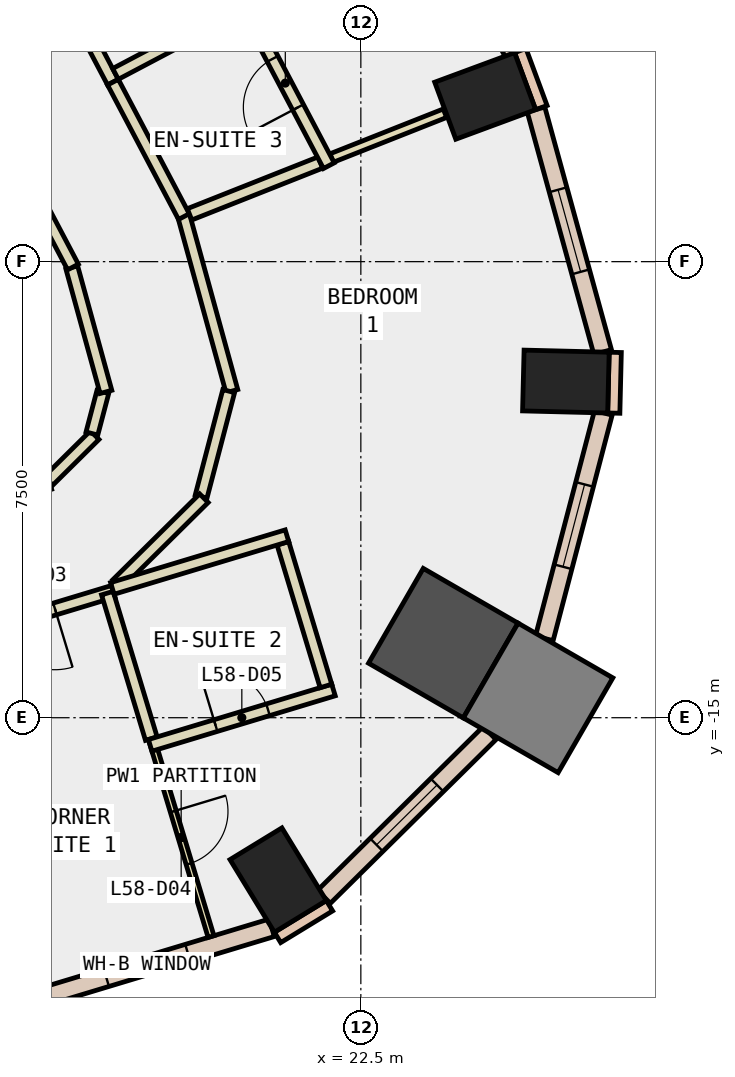
"""IFC4 building model, lengths in metres.
Left out: names, types, materials, properties, quantities, classifications, styles, units other than length and angle.
Written with IfcOpenShell. Run it as: python <this file> out.ifc"""

import sys

from ifc_helpers import new_model, si_unit, direction, frame, frame_2d, origin, origin_2d, place, context, subcontext, project, spatial, rectangle, extrude, element, fill, save


model = new_model("IFC4")
c1 = context("Model", 3, precision=1e-05, world=origin(), true_north=direction((0.0, 1.0)))
c2 = subcontext(c1, "Body", "Model", "MODEL_VIEW")
j1 = project(units=[si_unit("LENGTHUNIT", "METRE"), si_unit("PLANEANGLEUNIT", "RADIAN")], contexts=[c1])
p1 = place(None, origin())
s1 = spatial("IfcSite", under=j1, at=p1, CompositionType="ELEMENT")
p2 = place(p1, origin())
s2 = spatial("IfcBuilding", under=s1, at=p2, CompositionType="ELEMENT")
p3 = place(p2, frame((0.0, 0.0, 255.8)))
s3 = spatial("IfcBuildingStorey", under=s2, at=p3, CompositionType="ELEMENT", Elevation=255.8)
p4 = place(p3, frame((21.14, -17.67, -0.34), z_axis=(0.0, 0.0, 1.0), x_axis=(0.853341581839, 0.521352227103, 0.0)))
e1 = element("IfcColumn", 1, at=p4, inside=s3, PredefinedType="COLUMN", context=c2, shape_type="SweptSolid", body=[
    extrude(rectangle(XDim=1.0, YDim=1.4, at=origin_2d()), origin(), (0.0, 0.0, 1.0), 3.6),
])
p5 = place(p3, frame((23.856, -13.774, -0.34), z_axis=(0.0, 0.0, 1.0), x_axis=(-0.866025403784, 0.5, 0.0)))
e2 = element("IfcColumn", 2, at=p5, inside=s3, PredefinedType="COLUMN", context=c2, shape_type="SweptSolid", body=[
    extrude(rectangle(XDim=1.8, YDim=1.8, at=origin_2d()), origin(), (0.0, 0.0, 1.0), 3.6),
])
for number, where, z_axis, x_axis in (
    (3, (25.872, -9.472, -0.34), (0.0, 0.0, 1.0), (0.025, 1.0, 0.0)),
    (4, (24.545, -4.775, -0.34), (0.0, 0.0, 1.0), (-0.347, 0.938, 0.0)),
):
    element("IfcColumn", number, at=place(p3, frame(where, z_axis=z_axis, x_axis=x_axis)), inside=s3, PredefinedType="COLUMN", context=c2, shape_type="SweptSolid", body=[
        extrude(rectangle(XDim=1.0, YDim=1.4, at=origin_2d()), origin(), (0.0, 0.0, 1.0), 3.6),
    ])
p6 = place(p3, frame((25.415, -14.674, -0.34), z_axis=(0.0, 0.0, 1.0), x_axis=(-0.866025403784, 0.5, 0.0)))
e5 = element("IfcColumn", 5, at=p6, inside=s3, PredefinedType="COLUMN", context=c2, shape_type="SweptSolid", body=[
    extrude(rectangle(XDim=1.8, YDim=1.8, at=origin_2d()), origin(), (0.0, 0.0, 1.0), 3.6),
])
p7 = place(p3, frame((25.469, -4.967, 0.0), z_axis=(0.0, 0.0, 1.0), x_axis=(-0.346892928577, 0.937904737222, 0.0)))
e6 = element("IfcWall", 6, at=p7, inside=s3, PredefinedType="STANDARD", context=c2, shape_type="SweptSolid", body=[
    extrude(rectangle(XDim=1.0, YDim=0.2, at=frame_2d((0.5, 0.0))), origin(), (0.0, 0.0, 1.0), 3.26),
])
p8 = place(p3, frame((21.13, -18.613, 0.0), z_axis=(0.0, 0.0, 1.0), x_axis=(0.853679739553, 0.520798331677, 0.0)))
e7 = element("IfcWall", 7, at=p8, inside=s3, PredefinedType="STANDARD", context=c2, shape_type="SweptSolid", body=[
    extrude(rectangle(XDim=1.0, YDim=0.2, at=frame_2d((0.5, 0.0))), origin(), (0.0, 0.0, 1.0), 3.26),
])
p9 = place(p3, frame((26.66, -9.991, 0.0), z_axis=(0.0, 0.0, 1.0), x_axis=(0.024186470916, 0.999707464524, 0.0)))
e8 = element("IfcWall", 8, at=p9, inside=s3, PredefinedType="STANDARD", context=c2, shape_type="SweptSolid", body=[
    extrude(rectangle(XDim=0.999, YDim=0.2, at=frame_2d((0.5, 0.0))), origin(), (0.0, 0.0, 1.0), 3.26),
])
p10 = place(p3, frame((16.936, -19.692, 0.0), z_axis=(0.0, 0.0, 1.0), x_axis=(0.957346168713, 0.288943442997, 0.0)))
e9 = element("IfcWall", 9, at=p10, inside=s3, PredefinedType="STANDARD", context=c2, shape_type="SweptSolid", body=[
    extrude(rectangle(XDim=4.281, YDim=0.3, at=frame_2d((2.14, 0.0))), origin(), (0.0, 0.0, 1.0), 3.26),
])
p11 = place(p10, frame((1.44, 0.0, 0.9)))
e10 = element("IfcOpeningElement", 10, at=p11, cuts=e9, PredefinedType="OPENING", context=c2, shape_type="SweptSolid", body=[
    extrude(rectangle(XDim=1.4, YDim=2.0, at=frame_2d((0.7, 1.0))), frame((0.0, 0.16, 0.0), z_axis=(0.0, -1.0, 0.0), x_axis=(1.0, 0.0, 0.0)), (0.0, 0.0, 1.0), 0.32),
])
p12 = place(p3, frame((21.893, -17.946, 0.0), z_axis=(0.0, 0.0, 1.0), x_axis=(0.71110935557, 0.703081420904, 0.0)))
e11 = element("IfcWall", 11, at=p12, inside=s3, PredefinedType="STANDARD", context=c2, shape_type="SweptSolid", body=[
    extrude(rectangle(XDim=3.832, YDim=0.3, at=frame_2d((1.916, 0.0))), origin(), (0.0, 0.0, 1.0), 3.26),
])
p13 = place(p12, frame((1.216, 0.0, 0.9)))
e12 = element("IfcOpeningElement", 12, at=p13, cuts=e11, PredefinedType="OPENING", context=c2, shape_type="SweptSolid", body=[
    extrude(rectangle(XDim=1.4, YDim=2.0, at=frame_2d((0.7, 1.0))), frame((0.0, 0.16, 0.0), z_axis=(0.0, -1.0, 0.0), x_axis=(1.0, 0.0, 0.0)), (0.0, 0.0, 1.0), 0.32),
])
p14 = place(p3, frame((25.517, -13.695, 0.0), z_axis=(0.0, 0.0, 1.0), x_axis=(0.253248721632, 0.967401201669, 0.0)))
e13 = element("IfcWall", 13, at=p14, inside=s3, PredefinedType="STANDARD", context=c2, shape_type="SweptSolid", body=[
    extrude(rectangle(XDim=3.834, YDim=0.3, at=frame_2d((1.917, 0.0))), origin(), (0.0, 0.0, 1.0), 3.26),
])
p15 = place(p14, frame((1.217, 0.0, 0.9)))
e14 = element("IfcOpeningElement", 14, at=p15, cuts=e13, PredefinedType="OPENING", context=c2, shape_type="SweptSolid", body=[
    extrude(rectangle(XDim=1.4, YDim=2.0, at=frame_2d((0.7, 1.0))), frame((0.0, 0.16, 0.0), z_axis=(0.0, -1.0, 0.0), x_axis=(1.0, 0.0, 0.0)), (0.0, 0.0, 1.0), 0.32),
])
p16 = place(p3, frame((26.477, -8.987, 0.0), z_axis=(0.0, 0.0, 1.0), x_axis=(-0.264924661919, 0.964269113633, 0.0)))
e15 = element("IfcWall", 15, at=p16, inside=s3, PredefinedType="STANDARD", context=c2, shape_type="SweptSolid", body=[
    extrude(rectangle(XDim=4.137, YDim=0.3, at=frame_2d((2.068, 0.0))), origin(), (0.0, 0.0, 1.0), 3.26),
])
p17 = place(p16, frame((1.368, 0.0, 0.9)))
e16 = element("IfcOpeningElement", 16, at=p17, cuts=e15, PredefinedType="OPENING", context=c2, shape_type="SweptSolid", body=[
    extrude(rectangle(XDim=1.4, YDim=2.0, at=frame_2d((0.7, 1.0))), frame((0.0, 0.16, 0.0), z_axis=(0.0, -1.0, 0.0), x_axis=(1.0, 0.0, 0.0)), (0.0, 0.0, 1.0), 0.32),
])
p18 = place(p3, frame((25.012, -4.07, 0.0), z_axis=(0.0, 0.0, 1.0), x_axis=(-0.466663589714, 0.884434900959, 0.0)))
e17 = element("IfcWall", 17, at=p18, inside=s3, PredefinedType="STANDARD", context=c2, shape_type="SweptSolid", body=[
    extrude(rectangle(XDim=5.638, YDim=0.3, at=frame_2d((2.819, 0.0))), origin(), (0.0, 0.0, 1.0), 3.26),
])
p19 = place(p18, frame((0.459, 0.0, 0.9)))
e18 = element("IfcOpeningElement", 18, at=p19, cuts=e17, PredefinedType="OPENING", context=c2, shape_type="SweptSolid", body=[
    extrude(rectangle(XDim=1.9, YDim=2.0, at=frame_2d((0.95, 1.0))), frame((0.0, 0.16, 0.0), z_axis=(0.0, -1.0, 0.0), x_axis=(1.0, 0.0, 0.0)), (0.0, 0.0, 1.0), 0.32),
])
p20 = place(p18, frame((3.278, 0.0, 0.9)))
e19 = element("IfcOpeningElement", 19, at=p20, cuts=e17, PredefinedType="OPENING", context=c2, shape_type="SweptSolid", body=[
    extrude(rectangle(XDim=1.9, YDim=2.0, at=frame_2d((0.95, 1.0))), frame((0.0, 0.16, 0.0), z_axis=(0.0, -1.0, 0.0), x_axis=(1.0, 0.0, 0.0)), (0.0, 0.0, 1.0), 0.32),
])
p21 = place(p3, frame((17.362, -11.106, 0.0), z_axis=(0.0, 0.0, 1.0), x_axis=(0.710859741153, 0.703333795866, 0.0)))
e20 = element("IfcWall", 20, at=p21, inside=s3, PredefinedType="PARTITIONING", context=c2, shape_type="SweptSolid", body=[
    extrude(rectangle(XDim=1.071, YDim=0.2, at=frame_2d((0.535, 0.0))), origin(), (0.0, 0.0, 1.0), 3.26),
])
p22 = place(p3, frame((18.077, -10.326, 0.0), z_axis=(0.0, 0.0, 1.0), x_axis=(0.254782174857, 0.966998471237, 0.0)))
e21 = element("IfcWall", 21, at=p22, inside=s3, PredefinedType="PARTITIONING", context=c2, shape_type="SweptSolid", body=[
    extrude(rectangle(XDim=0.707, YDim=0.2, at=frame_2d((0.354, 0.0))), origin(), (0.0, 0.0, 1.0), 3.26),
])
p23 = place(p3, frame((18.308, -9.642, 0.0), z_axis=(0.0, 0.0, 1.0), x_axis=(-0.264859637197, 0.96428697626, 0.0)))
e22 = element("IfcWall", 22, at=p23, inside=s3, PredefinedType="PARTITIONING", context=c2, shape_type="SweptSolid", body=[
    extrude(rectangle(XDim=2.122, YDim=0.2, at=frame_2d((1.061, 0.0))), origin(), (0.0, 0.0, 1.0), 3.26),
])
p24 = place(p3, frame((17.766, -7.588, 0.0), z_axis=(0.0, 0.0, 1.0), x_axis=(-0.466727344864, 0.884401258228, 0.0)))
e23 = element("IfcWall", 23, at=p24, inside=s3, PredefinedType="PARTITIONING", context=c2, shape_type="SweptSolid", body=[
    extrude(rectangle(XDim=2.205, YDim=0.2, at=frame_2d((1.103, 0.0))), origin(), (0.0, 0.0, 1.0), 3.26),
])
p25 = place(p3, frame((18.427, -12.922, 0.0), z_axis=(0.0, 0.0, 1.0), x_axis=(-0.957336631432, -0.288975040651, 0.0)))
e24 = element("IfcWall", 24, at=p25, inside=s3, PredefinedType="PARTITIONING", context=c2, shape_type="SweptSolid", body=[
    extrude(rectangle(XDim=3.0, YDim=0.2, at=frame_2d((1.5, 0.0))), origin(), (0.0, 0.0, 1.0), 3.26),
])
p26 = place(p25, frame((1.0, 0.0, 0.0)))
e25 = element("IfcOpeningElement", 25, at=p26, cuts=e24, PredefinedType="OPENING", context=c2, shape_type="SweptSolid", body=[
    extrude(rectangle(XDim=1.0, YDim=2.1, at=frame_2d((0.5, 1.05))), frame((0.0, 0.11, 0.0), z_axis=(0.0, -1.0, 0.0), x_axis=(1.0, 0.0, 0.0)), (0.0, 0.0, 1.0), 0.22),
])
p27 = place(p3, frame((19.564, -6.662, 0.0), z_axis=(0.0, 0.0, 1.0), x_axis=(0.264876135597, -0.96428244451, 0.0)))
e26 = element("IfcWall", 26, at=p27, inside=s3, PredefinedType="PARTITIONING", context=c2, shape_type="SweptSolid", body=[
    extrude(rectangle(XDim=3.077, YDim=0.2, at=frame_2d((1.538, 0.0))), origin(), (0.0, 0.0, 1.0), 3.26),
])
p28 = place(p3, frame((20.327, -9.629, 0.0), z_axis=(0.0, 0.0, 1.0), x_axis=(-0.253192482031, -0.967415922467, 0.0)))
e27 = element("IfcWall", 27, at=p28, inside=s3, PredefinedType="PARTITIONING", context=c2, shape_type="SweptSolid", body=[
    extrude(rectangle(XDim=1.792, YDim=0.2, at=frame_2d((0.896, 0.0))), origin(), (0.0, 0.0, 1.0), 3.26),
])
p29 = place(p3, frame((19.919, -11.39, 0.0), z_axis=(0.0, 0.0, 1.0), x_axis=(-0.71104667794, -0.70314480855, 0.0)))
e28 = element("IfcWall", 28, at=p29, inside=s3, PredefinedType="PARTITIONING", context=c2, shape_type="SweptSolid", body=[
    extrude(rectangle(XDim=2.008, YDim=0.2, at=frame_2d((1.004, 0.0))), origin(), (0.0, 0.0, 1.0), 3.26),
])
p30 = place(p3, frame((16.778, -1.429, 0.0), z_axis=(0.0, 0.0, 1.0), x_axis=(0.466493865945, -0.884524433261, 0.0)))
e29 = element("IfcWall", 29, at=p30, inside=s3, PredefinedType="PARTITIONING", context=c2, shape_type="SweptSolid", body=[
    extrude(rectangle(XDim=3.526, YDim=0.2, at=frame_2d((1.763, 0.0))), origin(), (0.0, 0.0, 1.0), 3.26),
])
p31 = place(p30, frame((1.313, 0.0, 0.0)))
e30 = element("IfcOpeningElement", 30, at=p31, cuts=e29, PredefinedType="OPENING", context=c2, shape_type="SweptSolid", body=[
    extrude(rectangle(XDim=1.0, YDim=2.1, at=frame_2d((0.5, 1.05))), frame((0.0, 0.11, 0.0), z_axis=(0.0, -1.0, 0.0), x_axis=(1.0, 0.0, 0.0)), (0.0, 0.0, 1.0), 0.22),
])
p32 = place(p3, frame((18.423, -4.548, 0.0), z_axis=(0.0, 0.0, 1.0), x_axis=(0.466792565793, -0.884366835946, 0.0)))
e31 = element("IfcWall", 31, at=p32, inside=s3, PredefinedType="PARTITIONING", context=c2, shape_type="SweptSolid", body=[
    extrude(rectangle(XDim=2.5, YDim=0.2, at=frame_2d((1.25, 0.0))), origin(), (0.0, 0.0, 1.0), 3.26),
])
p33 = place(p3, frame((19.054, -15.344, 0.0), z_axis=(0.0, 0.0, 1.0), x_axis=(0.288803435252, -0.957388414274, 0.0)))
e32 = element("IfcWall", 32, at=p33, inside=s3, PredefinedType="PARTITIONING", context=c2, shape_type="SweptSolid", body=[
    extrude(rectangle(XDim=3.4, YDim=0.1, at=frame_2d((1.7, 0.0))), origin(), (0.0, 0.0, 1.0), 3.26),
])
p34 = place(p33, frame((1.25, 0.0, 0.0)))
e33 = element("IfcOpeningElement", 33, at=p34, cuts=e32, PredefinedType="OPENING", context=c2, shape_type="SweptSolid", body=[
    extrude(rectangle(XDim=0.9, YDim=2.1, at=frame_2d((0.45, 1.05))), frame((0.0, 0.06, 0.0), z_axis=(0.0, -1.0, 0.0), x_axis=(1.0, 0.0, 0.0)), (0.0, 0.0, 1.0), 0.12),
])
p35 = place(p3, frame((18.331, -12.951, 0.0), z_axis=(0.0, 0.0, 1.0), x_axis=(0.289175152117, -0.957276204341, 0.0)))
e34 = element("IfcWall", 34, at=p35, inside=s3, PredefinedType="PARTITIONING", context=c2, shape_type="SweptSolid", body=[
    extrude(rectangle(XDim=2.5, YDim=0.2, at=frame_2d((1.25, 0.0))), origin(), (0.0, 0.0, 1.0), 3.26),
])
p36 = place(p3, frame((19.035, -15.455, 0.0), z_axis=(0.0, 0.0, 1.0), x_axis=(0.957248369253, 0.28926728049, 0.0)))
e35 = element("IfcWall", 35, at=p36, inside=s3, PredefinedType="PARTITIONING", context=c2, shape_type="SweptSolid", body=[
    extrude(rectangle(XDim=3.15, YDim=0.2, at=frame_2d((1.575, 0.0))), origin(), (0.0, 0.0, 1.0), 3.26),
])
p37 = place(p36, frame((1.125, 0.0, 0.0)))
e36 = element("IfcOpeningElement", 36, at=p37, cuts=e35, PredefinedType="OPENING", context=c2, shape_type="SweptSolid", body=[
    extrude(rectangle(XDim=0.9, YDim=2.1, at=frame_2d((0.45, 1.05))), frame((0.0, 0.11, 0.0), z_axis=(0.0, -1.0, 0.0), x_axis=(1.0, 0.0, 0.0)), (0.0, 0.0, 1.0), 0.22),
])
p38 = place(p3, frame((21.926, -14.478, 0.0), z_axis=(0.0, 0.0, 1.0), x_axis=(-0.288928787246, 0.957350591947, 0.0)))
e37 = element("IfcWall", 37, at=p38, inside=s3, PredefinedType="PARTITIONING", context=c2, shape_type="SweptSolid", body=[
    extrude(rectangle(XDim=2.45, YDim=0.2, at=frame_2d((1.225, 0.0))), origin(), (0.0, 0.0, 1.0), 3.26),
])
p39 = place(p3, frame((21.285, -12.007, 0.0), z_axis=(0.0, 0.0, 1.0), x_axis=(-0.957329834998, -0.288997555392, 0.0)))
e38 = element("IfcWall", 38, at=p39, inside=s3, PredefinedType="PARTITIONING", context=c2, shape_type="SweptSolid", body=[
    extrude(rectangle(XDim=3.0, YDim=0.2, at=frame_2d((1.5, 0.0))), origin(), (0.0, 0.0, 1.0), 3.26),
])
p40 = place(p3, frame((22.02, -5.796, 0.0), z_axis=(0.0, 0.0, 1.0), x_axis=(0.929915172208, 0.367774078066, 0.0)))
e39 = element("IfcWall", 39, at=p40, inside=s3, PredefinedType="PARTITIONING", context=c2, shape_type="SweptSolid", body=[
    extrude(rectangle(XDim=2.003, YDim=0.15, at=frame_2d((1.002, 0.0))), origin(), (0.0, 0.0, 1.0), 3.26),
])
p41 = place(p3, frame((19.683, -6.722, 0.0), z_axis=(0.0, 0.0, 1.0), x_axis=(0.929744903847, 0.368204309821, 0.0)))
e40 = element("IfcWall", 40, at=p41, inside=s3, PredefinedType="PARTITIONING", context=c2, shape_type="SweptSolid", body=[
    extrude(rectangle(XDim=2.313, YDim=0.2, at=frame_2d((1.157, 0.0))), origin(), (0.0, 0.0, 1.0), 3.26),
])
p42 = place(p3, frame((21.974, -5.922, 0.0), z_axis=(0.0, 0.0, 1.0), x_axis=(-0.466401249432, 0.88457327256, 0.0)))
e41 = element("IfcWall", 41, at=p42, inside=s3, PredefinedType="PARTITIONING", context=c2, shape_type="SweptSolid", body=[
    extrude(rectangle(XDim=3.073, YDim=0.2, at=frame_2d((1.536, 0.0))), origin(), (0.0, 0.0, 1.0), 3.26),
])
p43 = place(p42, frame((1.086, 0.0, 0.0)))
e42 = element("IfcOpeningElement", 42, at=p43, cuts=e41, PredefinedType="OPENING", context=c2, shape_type="SweptSolid", body=[
    extrude(rectangle(XDim=0.9, YDim=2.1, at=frame_2d((0.45, 1.05))), frame((0.0, 0.11, 0.0), z_axis=(0.0, -1.0, 0.0), x_axis=(1.0, 0.0, 0.0)), (0.0, 0.0, 1.0), 0.22),
])
p44 = place(p3, frame((20.499, -3.339, 0.0), z_axis=(0.0, 0.0, 1.0), x_axis=(-0.884293452572, -0.466931568583, 0.0)))
e43 = element("IfcWall", 43, at=p44, inside=s3, PredefinedType="PARTITIONING", context=c2, shape_type="SweptSolid", body=[
    extrude(rectangle(XDim=2.3, YDim=0.2, at=frame_2d((1.15, 0.0))), origin(), (0.0, 0.0, 1.0), 3.26),
])
p45 = place(p11, origin())
e44 = element("IfcWindow", 44, at=p45, inside=s3, PartitioningType="SINGLE_PANEL", PredefinedType="WINDOW", context=c2, shape_type="SweptSolid", body=[
    extrude(rectangle(XDim=1.4, YDim=2.0, at=frame_2d((0.7, 1.0))), frame((0.0, 0.03, 0.0), z_axis=(0.0, -1.0, 0.0), x_axis=(1.0, 0.0, 0.0)), (0.0, 0.0, 1.0), 0.06),
])
fill(e10, e44)
p46 = place(p13, origin())
e45 = element("IfcWindow", 45, at=p46, inside=s3, PartitioningType="SINGLE_PANEL", PredefinedType="WINDOW", context=c2, shape_type="SweptSolid", body=[
    extrude(rectangle(XDim=1.4, YDim=2.0, at=frame_2d((0.7, 1.0))), frame((0.0, 0.03, 0.0), z_axis=(0.0, -1.0, 0.0), x_axis=(1.0, 0.0, 0.0)), (0.0, 0.0, 1.0), 0.06),
])
fill(e12, e45)
p47 = place(p15, origin())
e46 = element("IfcWindow", 46, at=p47, inside=s3, PartitioningType="SINGLE_PANEL", PredefinedType="WINDOW", context=c2, shape_type="SweptSolid", body=[
    extrude(rectangle(XDim=1.4, YDim=2.0, at=frame_2d((0.7, 1.0))), frame((0.0, 0.03, 0.0), z_axis=(0.0, -1.0, 0.0), x_axis=(1.0, 0.0, 0.0)), (0.0, 0.0, 1.0), 0.06),
])
fill(e14, e46)
p48 = place(p17, origin())
e47 = element("IfcWindow", 47, at=p48, inside=s3, PartitioningType="SINGLE_PANEL", PredefinedType="WINDOW", context=c2, shape_type="SweptSolid", body=[
    extrude(rectangle(XDim=1.4, YDim=2.0, at=frame_2d((0.7, 1.0))), frame((0.0, 0.03, 0.0), z_axis=(0.0, -1.0, 0.0), x_axis=(1.0, 0.0, 0.0)), (0.0, 0.0, 1.0), 0.06),
])
fill(e16, e47)
p49 = place(p26, origin())
e48 = element("IfcDoor", 48, at=p49, inside=s3, OperationType="SINGLE_SWING_LEFT", PredefinedType="DOOR", context=c2, shape_type="SweptSolid", body=[
    extrude(rectangle(XDim=1.0, YDim=2.1, at=frame_2d((0.5, 1.05))), frame((0.0, 0.025, 0.0), z_axis=(0.0, -1.0, 0.0), x_axis=(1.0, 0.0, 0.0)), (0.0, 0.0, 1.0), 0.05),
])
fill(e25, e48)
p50 = place(p34, origin())
e49 = element("IfcDoor", 49, at=p50, inside=s3, OperationType="SINGLE_SWING_RIGHT", PredefinedType="DOOR", context=c2, shape_type="SweptSolid", body=[
    extrude(rectangle(XDim=0.9, YDim=2.1, at=frame_2d((0.45, 1.05))), frame((0.0, 0.025, 0.0), z_axis=(0.0, -1.0, 0.0), x_axis=(1.0, 0.0, 0.0)), (0.0, 0.0, 1.0), 0.05),
])
fill(e33, e49)
p51 = place(p37, origin())
e50 = element("IfcDoor", 50, at=p51, inside=s3, OperationType="SINGLE_SWING_LEFT", PredefinedType="DOOR", context=c2, shape_type="SweptSolid", body=[
    extrude(rectangle(XDim=0.9, YDim=2.1, at=frame_2d((0.45, 1.05))), frame((0.0, 0.025, 0.0), z_axis=(0.0, -1.0, 0.0), x_axis=(1.0, 0.0, 0.0)), (0.0, 0.0, 1.0), 0.05),
])
fill(e36, e50)
p52 = place(p43, origin())
e51 = element("IfcDoor", 51, at=p52, inside=s3, OperationType="SINGLE_SWING_RIGHT", PredefinedType="DOOR", context=c2, shape_type="SweptSolid", body=[
    extrude(rectangle(XDim=0.9, YDim=2.1, at=frame_2d((0.45, 1.05))), frame((0.0, 0.025, 0.0), z_axis=(0.0, -1.0, 0.0), x_axis=(1.0, 0.0, 0.0)), (0.0, 0.0, 1.0), 0.05),
])
fill(e42, e51)
save(model, sys.argv[1])
